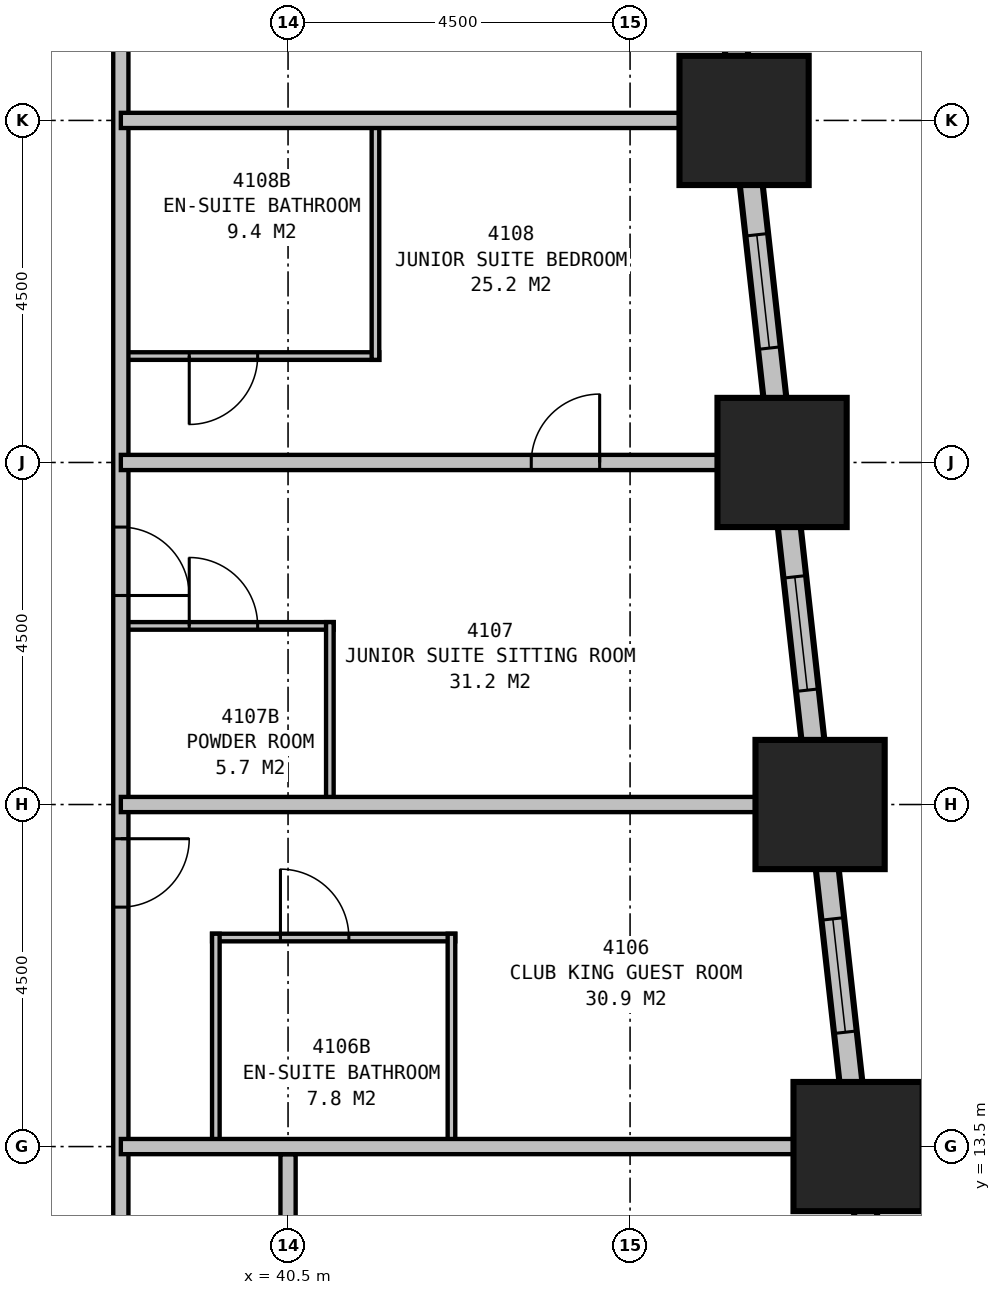
"""IFC4 building model, lengths in metres.
Left out: names, types, materials, properties, quantities, classifications, styles, units other than length and angle.
Written with IfcOpenShell. Run it as: python <this file> out.ifc"""

import sys

from ifc_helpers import new_model, si_unit, direction, frame, frame_2d, origin, origin_2d, place, context, subcontext, project, spatial, rectangle, extrude, element, fill, save


model = new_model("IFC4")
c1 = context("Model", 3, precision=1e-05, world=origin(), true_north=direction((0.0, 1.0)))
c2 = subcontext(c1, "Body", "Model", "MODEL_VIEW")
j1 = project(units=[si_unit("LENGTHUNIT", "METRE"), si_unit("PLANEANGLEUNIT", "RADIAN")], contexts=[c1])
p1 = place(None, origin())
s1 = spatial("IfcSite", under=j1, at=p1, CompositionType="ELEMENT")
p2 = place(p1, origin())
s2 = spatial("IfcBuilding", under=s1, at=p2, CompositionType="ELEMENT")
p3 = place(p2, frame((0.0, 0.0, 162.4)))
s3 = spatial("IfcBuildingStorey", under=s2, at=p3, CompositionType="ELEMENT", Elevation=162.4)
for number, where, z_axis, x_axis in (
    (1, (48.0, 13.5, 0.0), (0.0, 0.0, 1.0), (1.0, 0.0, 0.0)),
    (2, (47.5, 18.0, 0.0), (0.0, 0.0, 1.0), (1.0, 0.0, 0.0)),
    (3, (47.0, 22.5, 0.0), (0.0, 0.0, 1.0), (1.0, 0.0, 0.0)),
    (4, (46.5, 27.0, 0.0), (0.0, 0.0, 1.0), (1.0, 0.0, 0.0)),
):
    element("IfcColumn", number, at=place(p3, frame(where, z_axis=z_axis, x_axis=x_axis)), inside=s3, PredefinedType="COLUMN", context=c2, shape_type="SweptSolid", body=[
        extrude(rectangle(XDim=1.7, YDim=1.7, at=origin_2d()), origin(), (0.0, 0.0, 1.0), 3.5),
    ])
p4 = place(p3, frame((49.017, 4.351, 0.0), z_axis=(0.0, 0.0, 1.0), x_axis=(-0.110433201132, 0.993883548555, 0.0)))
e5 = element("IfcWall", 5, at=p4, inside=s3, PredefinedType="STANDARD", context=c2, shape_type="SweptSolid", body=[
    extrude(rectangle(XDim=31.994, YDim=0.3, at=frame_2d((15.997, 0.0))), origin(), (0.0, 0.0, 1.0), 2.25),
])
p5 = place(p4, frame((1.664, 0.0, 0.5)))
e6 = element("IfcOpeningElement", 6, at=p5, cuts=e5, PredefinedType="OPENING", context=c2, shape_type="SweptSolid", body=[
    extrude(rectangle(XDim=1.5, YDim=1.6, at=frame_2d((0.75, 0.8))), frame((0.0, 0.16, 0.0), z_axis=(0.0, -1.0, 0.0), x_axis=(1.0, 0.0, 0.0)), (0.0, 0.0, 1.0), 0.32),
])
p6 = place(p4, frame((6.192, 0.0, 0.5)))
e7 = element("IfcOpeningElement", 7, at=p6, cuts=e5, PredefinedType="OPENING", context=c2, shape_type="SweptSolid", body=[
    extrude(rectangle(XDim=1.5, YDim=1.6, at=frame_2d((0.75, 0.8))), frame((0.0, 0.16, 0.0), z_axis=(0.0, -1.0, 0.0), x_axis=(1.0, 0.0, 0.0)), (0.0, 0.0, 1.0), 0.32),
])
p7 = place(p4, frame((10.719, 0.0, 0.5)))
e8 = element("IfcOpeningElement", 8, at=p7, cuts=e5, PredefinedType="OPENING", context=c2, shape_type="SweptSolid", body=[
    extrude(rectangle(XDim=1.5, YDim=1.6, at=frame_2d((0.75, 0.8))), frame((0.0, 0.16, 0.0), z_axis=(0.0, -1.0, 0.0), x_axis=(1.0, 0.0, 0.0)), (0.0, 0.0, 1.0), 0.32),
])
p8 = place(p4, frame((15.247, 0.0, 0.5)))
e9 = element("IfcOpeningElement", 9, at=p8, cuts=e5, PredefinedType="OPENING", context=c2, shape_type="SweptSolid", body=[
    extrude(rectangle(XDim=1.5, YDim=1.6, at=frame_2d((0.75, 0.8))), frame((0.0, 0.16, 0.0), z_axis=(0.0, -1.0, 0.0), x_axis=(1.0, 0.0, 0.0)), (0.0, 0.0, 1.0), 0.32),
])
p9 = place(p4, frame((19.775, 0.0, 0.5)))
e10 = element("IfcOpeningElement", 10, at=p9, cuts=e5, PredefinedType="OPENING", context=c2, shape_type="SweptSolid", body=[
    extrude(rectangle(XDim=1.5, YDim=1.6, at=frame_2d((0.75, 0.8))), frame((0.0, 0.16, 0.0), z_axis=(0.0, -1.0, 0.0), x_axis=(1.0, 0.0, 0.0)), (0.0, 0.0, 1.0), 0.32),
])
p10 = place(p4, frame((24.302, 0.0, 0.5)))
e11 = element("IfcOpeningElement", 11, at=p10, cuts=e5, PredefinedType="OPENING", context=c2, shape_type="SweptSolid", body=[
    extrude(rectangle(XDim=1.5, YDim=1.6, at=frame_2d((0.75, 0.8))), frame((0.0, 0.16, 0.0), z_axis=(0.0, -1.0, 0.0), x_axis=(1.0, 0.0, 0.0)), (0.0, 0.0, 1.0), 0.32),
])
p11 = place(p4, frame((28.83, 0.0, 0.5)))
e12 = element("IfcOpeningElement", 12, at=p11, cuts=e5, PredefinedType="OPENING", context=c2, shape_type="SweptSolid", body=[
    extrude(rectangle(XDim=1.5, YDim=1.6, at=frame_2d((0.75, 0.8))), frame((0.0, 0.16, 0.0), z_axis=(0.0, -1.0, 0.0), x_axis=(1.0, 0.0, 0.0)), (0.0, 0.0, 1.0), 0.32),
])
p12 = place(p3, frame((38.3, 10.6, 0.0), z_axis=(0.0, 0.0, 1.0), x_axis=(0.0, 1.0, 0.0)))
e13 = element("IfcWall", 13, at=p12, inside=s3, PredefinedType="PARTITIONING", context=c2, shape_type="SweptSolid", body=[
    extrude(rectangle(XDim=18.7, YDim=0.2, at=frame_2d((9.35, 0.0))), origin(), (0.0, 0.0, 1.0), 3.25),
])
p13 = place(p12, frame((6.95, 0.0, 0.0), z_axis=(0.0, 0.0, 1.0), x_axis=(-1.0, 0.0, 0.0)))
e14 = element("IfcOpeningElement", 14, at=p13, cuts=e13, PredefinedType="OPENING", context=c2, shape_type="SweptSolid", body=[
    extrude(rectangle(XDim=0.9, YDim=2.1, at=frame_2d((0.45, 1.05))), frame((0.0, 0.11, 0.0), z_axis=(0.0, -1.0, 0.0), x_axis=(1.0, 0.0, 0.0)), (0.0, 0.0, 1.0), 0.22),
])
p14 = place(p12, frame((11.05, 0.0, 0.0), z_axis=(0.0, 0.0, 1.0), x_axis=(-1.0, 0.0, 0.0)))
e15 = element("IfcOpeningElement", 15, at=p14, cuts=e13, PredefinedType="OPENING", context=c2, shape_type="SweptSolid", body=[
    extrude(rectangle(XDim=0.9, YDim=2.1, at=frame_2d((0.45, 1.05))), frame((0.0, 0.11, 0.0), z_axis=(0.0, -1.0, 0.0), x_axis=(1.0, 0.0, 0.0)), (0.0, 0.0, 1.0), 0.22),
])
p15 = place(p3, frame((38.3, 18.0, 0.0), z_axis=(0.0, 0.0, 1.0), x_axis=(1.0, 0.0, 0.0)))
e16 = element("IfcWall", 16, at=p15, inside=s3, PredefinedType="PARTITIONING", context=c2, shape_type="SweptSolid", body=[
    extrude(rectangle(XDim=9.199, YDim=0.2, at=frame_2d((4.6, 0.0))), origin(), (0.0, 0.0, 1.0), 2.25),
])
p16 = place(p3, frame((38.3, 22.5, 0.0), z_axis=(0.0, 0.0, 1.0), x_axis=(1.0, 0.0, 0.0)))
e17 = element("IfcWall", 17, at=p16, inside=s3, PredefinedType="PARTITIONING", context=c2, shape_type="SweptSolid", body=[
    extrude(rectangle(XDim=8.699, YDim=0.2, at=frame_2d((4.35, 0.0))), origin(), (0.0, 0.0, 1.0), 2.25),
])
p17 = place(p16, frame((5.4, 0.0, 0.0)))
e18 = element("IfcOpeningElement", 18, at=p17, cuts=e17, PredefinedType="OPENING", context=c2, shape_type="SweptSolid", body=[
    extrude(rectangle(XDim=0.9, YDim=2.1, at=frame_2d((0.45, 1.05))), frame((0.0, 0.11, 0.0), z_axis=(0.0, -1.0, 0.0), x_axis=(1.0, 0.0, 0.0)), (0.0, 0.0, 1.0), 0.22),
])
for number, where, z_axis, x_axis in (
    (19, (39.55, 13.5, 0.0), (0.0, 0.0, 1.0), (0.0, 1.0, 0.0)),
    (20, (42.65, 13.5, 0.0), (0.0, 0.0, 1.0), (0.0, 1.0, 0.0)),
):
    element("IfcWall", number, at=place(p3, frame(where, z_axis=z_axis, x_axis=x_axis)), inside=s3, PredefinedType="PLUMBINGWALL", context=c2, shape_type="SweptSolid", body=[
        extrude(rectangle(XDim=2.8, YDim=0.1, at=frame_2d((1.4, 0.0))), origin(), (0.0, 0.0, 1.0), 3.25),
    ])
p18 = place(p3, frame((39.5, 16.25, 0.0), z_axis=(0.0, 0.0, 1.0), x_axis=(1.0, 0.0, 0.0)))
e21 = element("IfcWall", 21, at=p18, inside=s3, PredefinedType="PLUMBINGWALL", context=c2, shape_type="SweptSolid", body=[
    extrude(rectangle(XDim=3.2, YDim=0.1, at=frame_2d((1.6, 0.0))), origin(), (0.0, 0.0, 1.0), 3.25),
])
p19 = place(p18, frame((0.9, 0.0, 0.0)))
e22 = element("IfcOpeningElement", 22, at=p19, cuts=e21, PredefinedType="OPENING", context=c2, shape_type="SweptSolid", body=[
    extrude(rectangle(XDim=0.9, YDim=2.1, at=frame_2d((0.45, 1.05))), frame((0.0, 0.06, 0.0), z_axis=(0.0, -1.0, 0.0), x_axis=(1.0, 0.0, 0.0)), (0.0, 0.0, 1.0), 0.12),
])
p20 = place(p3, frame((41.05, 18.0, 0.0), z_axis=(0.0, 0.0, 1.0), x_axis=(0.0, 1.0, 0.0)))
e23 = element("IfcWall", 23, at=p20, inside=s3, PredefinedType="PLUMBINGWALL", context=c2, shape_type="SweptSolid", body=[
    extrude(rectangle(XDim=2.4, YDim=0.1, at=frame_2d((1.2, 0.0))), origin(), (0.0, 0.0, 1.0), 3.25),
])
p21 = place(p3, frame((38.3, 20.35, 0.0), z_axis=(0.0, 0.0, 1.0), x_axis=(1.0, 0.0, 0.0)))
e24 = element("IfcWall", 24, at=p21, inside=s3, PredefinedType="PLUMBINGWALL", context=c2, shape_type="SweptSolid", body=[
    extrude(rectangle(XDim=2.8, YDim=0.1, at=frame_2d((1.4, 0.0))), origin(), (0.0, 0.0, 1.0), 3.25),
])
p22 = place(p21, frame((0.9, 0.0, 0.0)))
e25 = element("IfcOpeningElement", 25, at=p22, cuts=e24, PredefinedType="OPENING", context=c2, shape_type="SweptSolid", body=[
    extrude(rectangle(XDim=0.9, YDim=2.1, at=frame_2d((0.45, 1.05))), frame((0.0, 0.06, 0.0), z_axis=(0.0, -1.0, 0.0), x_axis=(1.0, 0.0, 0.0)), (0.0, 0.0, 1.0), 0.12),
])
p23 = place(p3, frame((41.65, 23.85, 0.0), z_axis=(0.0, 0.0, 1.0), x_axis=(0.0, 1.0, 0.0)))
e26 = element("IfcWall", 26, at=p23, inside=s3, PredefinedType="PLUMBINGWALL", context=c2, shape_type="SweptSolid", body=[
    extrude(rectangle(XDim=3.15, YDim=0.1, at=frame_2d((1.575, 0.0))), origin(), (0.0, 0.0, 1.0), 3.25),
])
p24 = place(p3, frame((38.3, 23.9, 0.0), z_axis=(0.0, 0.0, 1.0), x_axis=(1.0, 0.0, 0.0)))
e27 = element("IfcWall", 27, at=p24, inside=s3, PredefinedType="PLUMBINGWALL", context=c2, shape_type="SweptSolid", body=[
    extrude(rectangle(XDim=3.4, YDim=0.1, at=frame_2d((1.7, 0.0))), origin(), (0.0, 0.0, 1.0), 3.25),
])
p25 = place(p24, frame((1.8, 0.0, 0.0), z_axis=(0.0, 0.0, 1.0), x_axis=(-1.0, 0.0, 0.0)))
e28 = element("IfcOpeningElement", 28, at=p25, cuts=e27, PredefinedType="OPENING", context=c2, shape_type="SweptSolid", body=[
    extrude(rectangle(XDim=0.9, YDim=2.1, at=frame_2d((0.45, 1.05))), frame((0.0, 0.06, 0.0), z_axis=(0.0, -1.0, 0.0), x_axis=(1.0, 0.0, 0.0)), (0.0, 0.0, 1.0), 0.12),
])
p26 = place(p3, frame((38.3, 13.5, 0.0), z_axis=(0.0, 0.0, 1.0), x_axis=(1.0, 0.0, 0.0)))
e29 = element("IfcWall", 29, at=p26, inside=s3, PredefinedType="PARTITIONING", context=c2, shape_type="SweptSolid", body=[
    extrude(rectangle(XDim=9.921, YDim=0.2, at=frame_2d((4.96, 0.0))), origin(), (0.0, 0.0, 1.0), 1.95),
])
p27 = place(p3, frame((40.5, 4.6, 0.0), z_axis=(0.0, 0.0, 1.0), x_axis=(0.0, 1.0, 0.0)))
e30 = element("IfcWall", 30, at=p27, inside=s3, PredefinedType="PARTITIONING", context=c2, shape_type="SweptSolid", body=[
    extrude(rectangle(XDim=8.8, YDim=0.2, at=frame_2d((4.4, 0.0))), origin(), (0.0, 0.0, 1.0), 2.25),
])
p28 = place(p27, frame((4.05, 0.0, 0.0)))
e31 = element("IfcOpeningElement", 31, at=p28, cuts=e30, PredefinedType="OPENING", context=c2, shape_type="SweptSolid", body=[
    extrude(rectangle(XDim=0.9, YDim=2.1, at=frame_2d((0.45, 1.05))), frame((0.0, 0.11, 0.0), z_axis=(0.0, -1.0, 0.0), x_axis=(1.0, 0.0, 0.0)), (0.0, 0.0, 1.0), 0.22),
])
p29 = place(p3, frame((38.3, 27.0, 0.0), z_axis=(0.0, 0.0, 1.0), x_axis=(1.0, 0.0, 0.0)))
e32 = element("IfcWall", 32, at=p29, inside=s3, PredefinedType="PARTITIONING", context=c2, shape_type="SweptSolid", body=[
    extrude(rectangle(XDim=7.977, YDim=0.2, at=frame_2d((3.988, 0.0))), origin(), (0.0, 0.0, 1.0), 1.95),
])
p30 = place(p7, origin())
e33 = element("IfcWindow", 33, at=p30, inside=s3, PartitioningType="SINGLE_PANEL", PredefinedType="WINDOW", context=c2, shape_type="SweptSolid", body=[
    extrude(rectangle(XDim=1.5, YDim=1.6, at=frame_2d((0.75, 0.8))), frame((0.0, 0.03, 0.0), z_axis=(0.0, -1.0, 0.0), x_axis=(1.0, 0.0, 0.0)), (0.0, 0.0, 1.0), 0.06),
])
fill(e8, e33)
p31 = place(p8, origin())
e34 = element("IfcWindow", 34, at=p31, inside=s3, PartitioningType="SINGLE_PANEL", PredefinedType="WINDOW", context=c2, shape_type="SweptSolid", body=[
    extrude(rectangle(XDim=1.5, YDim=1.6, at=frame_2d((0.75, 0.8))), frame((0.0, 0.03, 0.0), z_axis=(0.0, -1.0, 0.0), x_axis=(1.0, 0.0, 0.0)), (0.0, 0.0, 1.0), 0.06),
])
fill(e9, e34)
p32 = place(p9, origin())
e35 = element("IfcWindow", 35, at=p32, inside=s3, PartitioningType="SINGLE_PANEL", PredefinedType="WINDOW", context=c2, shape_type="SweptSolid", body=[
    extrude(rectangle(XDim=1.5, YDim=1.6, at=frame_2d((0.75, 0.8))), frame((0.0, 0.03, 0.0), z_axis=(0.0, -1.0, 0.0), x_axis=(1.0, 0.0, 0.0)), (0.0, 0.0, 1.0), 0.06),
])
fill(e10, e35)
p33 = place(p13, origin())
e36 = element("IfcDoor", 36, at=p33, inside=s3, OperationType="SINGLE_SWING_LEFT", PredefinedType="DOOR", context=c2, shape_type="SweptSolid", body=[
    extrude(rectangle(XDim=0.9, YDim=2.1, at=frame_2d((0.45, 1.05))), frame((0.0, 0.025, 0.0), z_axis=(0.0, -1.0, 0.0), x_axis=(1.0, 0.0, 0.0)), (0.0, 0.0, 1.0), 0.05),
])
fill(e14, e36)
p34 = place(p14, origin())
e37 = element("IfcDoor", 37, at=p34, inside=s3, OperationType="SINGLE_SWING_RIGHT", PredefinedType="DOOR", context=c2, shape_type="SweptSolid", body=[
    extrude(rectangle(XDim=0.9, YDim=2.1, at=frame_2d((0.45, 1.05))), frame((0.0, 0.025, 0.0), z_axis=(0.0, -1.0, 0.0), x_axis=(1.0, 0.0, 0.0)), (0.0, 0.0, 1.0), 0.05),
])
fill(e15, e37)
p35 = place(p17, origin())
e38 = element("IfcDoor", 38, at=p35, inside=s3, OperationType="SINGLE_SWING_RIGHT", PredefinedType="DOOR", context=c2, shape_type="SweptSolid", body=[
    extrude(rectangle(XDim=0.9, YDim=2.1, at=frame_2d((0.45, 1.05))), frame((0.0, 0.025, 0.0), z_axis=(0.0, -1.0, 0.0), x_axis=(1.0, 0.0, 0.0)), (0.0, 0.0, 1.0), 0.05),
])
fill(e18, e38)
p36 = place(p19, origin())
e39 = element("IfcDoor", 39, at=p36, inside=s3, OperationType="SINGLE_SWING_LEFT", PredefinedType="DOOR", context=c2, shape_type="SweptSolid", body=[
    extrude(rectangle(XDim=0.9, YDim=2.1, at=frame_2d((0.45, 1.05))), frame((0.0, 0.025, 0.0), z_axis=(0.0, -1.0, 0.0), x_axis=(1.0, 0.0, 0.0)), (0.0, 0.0, 1.0), 0.05),
])
fill(e22, e39)
p37 = place(p22, origin())
e40 = element("IfcDoor", 40, at=p37, inside=s3, OperationType="SINGLE_SWING_LEFT", PredefinedType="DOOR", context=c2, shape_type="SweptSolid", body=[
    extrude(rectangle(XDim=0.9, YDim=2.1, at=frame_2d((0.45, 1.05))), frame((0.0, 0.025, 0.0), z_axis=(0.0, -1.0, 0.0), x_axis=(1.0, 0.0, 0.0)), (0.0, 0.0, 1.0), 0.05),
])
fill(e25, e40)
p38 = place(p25, origin())
e41 = element("IfcDoor", 41, at=p38, inside=s3, OperationType="SINGLE_SWING_RIGHT", PredefinedType="DOOR", context=c2, shape_type="SweptSolid", body=[
    extrude(rectangle(XDim=0.9, YDim=2.1, at=frame_2d((0.45, 1.05))), frame((0.0, 0.025, 0.0), z_axis=(0.0, -1.0, 0.0), x_axis=(1.0, 0.0, 0.0)), (0.0, 0.0, 1.0), 0.05),
])
fill(e28, e41)
save(model, sys.argv[1])
